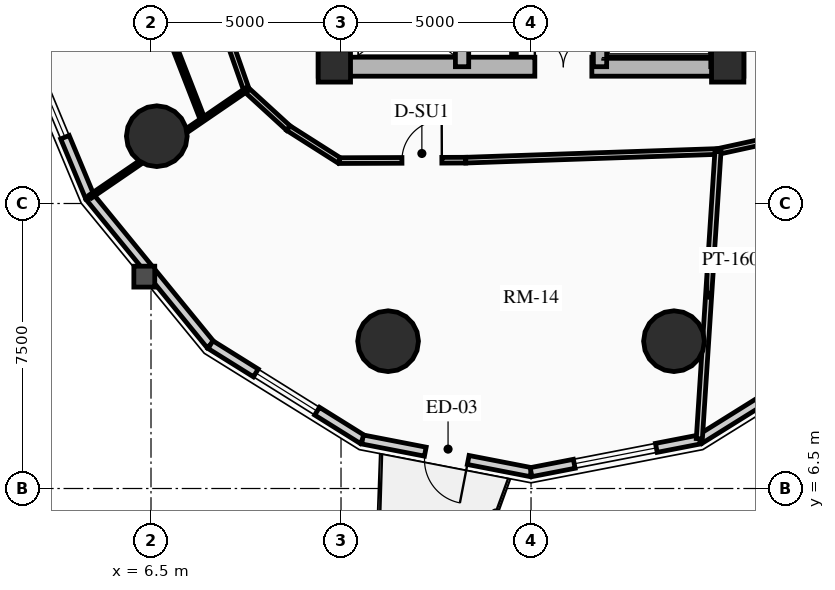
"""IFC4 building model, lengths in metres.
Left out: names, types, materials, properties, quantities, classifications, styles, units other than length and angle.
Written with IfcOpenShell. Run it as: python <this file> out.ifc"""

import sys

from ifc_helpers import new_model, si_unit, direction, frame, frame_2d, origin, origin_2d, place, context, subcontext, project, spatial, rectangle, circle, extrude, source, transform, mapped, element, fill, save


model = new_model("IFC4")
c1 = context("Model", 3, precision=1e-05, world=origin(), true_north=direction((0.0, 1.0)))
c2 = subcontext(c1, "Body", "Model", "MODEL_VIEW")
j1 = project(units=[si_unit("LENGTHUNIT", "METRE"), si_unit("PLANEANGLEUNIT", "RADIAN")], contexts=[c1])
p1 = place(None, origin())
s1 = spatial("IfcSite", under=j1, at=p1, CompositionType="ELEMENT")
p2 = place(p1, origin())
s2 = spatial("IfcBuilding", under=s1, at=p2, CompositionType="ELEMENT")
p3 = place(p2, frame((0.0, 0.0, 24.91)))
s3 = spatial("IfcBuildingStorey", under=s2, at=p3, CompositionType="ELEMENT", Elevation=24.91)
for number, where, z_axis, x_axis in (
    (1, (11.15, 17.35, 0.0), (0.0, 0.0, 1.0), (0.0, 1.0, 0.0)),
    (2, (21.85, 17.35, 0.0), (0.0, 0.0, 1.0), (0.0, 1.0, 0.0)),
):
    element("IfcWall", number, at=place(p3, frame(where, z_axis=z_axis, x_axis=x_axis)), inside=s3, PredefinedType="SHEAR", context=c2, shape_type="SweptSolid", body=[
        extrude(rectangle(XDim=14.3, YDim=0.5, at=frame_2d((7.15, 0.0))), origin(), (0.0, 0.0, 1.0), 2.91),
    ])
p4 = place(p3, frame((11.15, 17.6, 0.0), z_axis=(0.0, 0.0, 1.0), x_axis=(1.0, 0.0, 0.0)))
e3 = element("IfcWall", 3, at=p4, inside=s3, PredefinedType="SHEAR", context=c2, shape_type="SweptSolid", body=[
    extrude(rectangle(XDim=10.7, YDim=0.5, at=frame_2d((5.35, 0.0))), origin(), (0.0, 0.0, 1.0), 2.91),
])
m1 = source(origin(), c2, "Body", "SweptSolid", [
    extrude(rectangle(XDim=1.5, YDim=2.02, at=frame_2d((0.75, 1.01))), frame((0.0, 0.26, 0.0), z_axis=(0.0, -1.0, 0.0), x_axis=(1.0, 0.0, 0.0)), (0.0, 0.0, 1.0), 0.52),
])
p5 = place(p4, frame((5.45, 0.0, 0.0)))
e4 = element("IfcOpeningElement", 4, at=p5, cuts=e3, PredefinedType="OPENING", context=c2, shape_type="MappedRepresentation", body=[
    mapped(m1, transform((0.0, 0.0, 0.0), x_axis=(1.0, 0.0, 0.0), y_axis=(0.0, 1.0, 0.0), z_axis=(0.0, 0.0, 1.0), scale=1.0)),
])
p6 = place(p3, frame((14.685, 17.6, 0.0), z_axis=(0.0, 0.0, 1.0), x_axis=(0.0, 1.0, 0.0)))
e5 = element("IfcWall", 5, at=p6, inside=s3, PredefinedType="SHEAR", context=c2, shape_type="SweptSolid", body=[
    extrude(rectangle(XDim=13.8, YDim=0.35, at=frame_2d((6.9, 0.0))), origin(), (0.0, 0.0, 1.0), 2.91),
])
m2 = source(origin(), c2, "Body", "SweptSolid", [
    extrude(rectangle(XDim=1.1, YDim=2.015, at=frame_2d((0.55, 1.007))), frame((0.0, 0.185, 0.0), z_axis=(0.0, -1.0, 0.0), x_axis=(1.0, 0.0, 0.0)), (0.0, 0.0, 1.0), 0.37),
])
p7 = place(p6, frame((4.9, 0.0, 0.0)))
e6 = element("IfcOpeningElement", 6, at=p7, cuts=e5, PredefinedType="OPENING", context=c2, shape_type="MappedRepresentation", body=[
    mapped(m2, transform((0.0, 0.0, 0.0), x_axis=(1.0, 0.0, 0.0), y_axis=(0.0, 1.0, 0.0), z_axis=(0.0, 0.0, 1.0), scale=1.0)),
])
m3 = source(origin(), c2, "Body", "SweptSolid", [
    extrude(rectangle(XDim=1.15, YDim=2.02, at=frame_2d((0.575, 1.01))), frame((0.0, 0.185, 0.0), z_axis=(0.0, -1.0, 0.0), x_axis=(1.0, 0.0, 0.0)), (0.0, 0.0, 1.0), 0.37),
])
p8 = place(p6, frame((7.32, 0.0, 0.0)))
e7 = element("IfcOpeningElement", 7, at=p8, cuts=e5, PredefinedType="OPENING", context=c2, shape_type="MappedRepresentation", body=[
    mapped(m3, transform((0.0, 0.0, 0.0), x_axis=(1.0, 0.0, 0.0), y_axis=(0.0, 1.0, 0.0), z_axis=(0.0, 0.0, 1.0), scale=1.0)),
])
p9 = place(p3, frame((18.315, 17.6, 0.0), z_axis=(0.0, 0.0, 1.0), x_axis=(0.0, 1.0, 0.0)))
e8 = element("IfcWall", 8, at=p9, inside=s3, PredefinedType="SHEAR", context=c2, shape_type="SweptSolid", body=[
    extrude(rectangle(XDim=13.8, YDim=0.35, at=frame_2d((6.9, 0.0))), origin(), (0.0, 0.0, 1.0), 2.91),
])
p10 = place(p9, frame((10.025, 0.0, 0.0)))
e9 = element("IfcOpeningElement", 9, at=p10, cuts=e8, PredefinedType="OPENING", context=c2, shape_type="MappedRepresentation", body=[
    mapped(m2, transform((0.0, 0.0, 0.0), x_axis=(1.0, 0.0, 0.0), y_axis=(0.0, 1.0, 0.0), z_axis=(0.0, 0.0, 1.0), scale=1.0)),
])
p11 = place(p9, frame((12.025, 0.0, 0.0)))
e10 = element("IfcOpeningElement", 10, at=p11, cuts=e8, PredefinedType="OPENING", context=c2, shape_type="MappedRepresentation", body=[
    mapped(m2, transform((0.0, 0.0, 0.0), x_axis=(1.0, 0.0, 0.0), y_axis=(0.0, 1.0, 0.0), z_axis=(0.0, 0.0, 1.0), scale=1.0)),
])
p12 = place(p9, frame((5.33, 0.0, 0.0)))
e11 = element("IfcOpeningElement", 11, at=p12, cuts=e8, PredefinedType="OPENING", context=c2, shape_type="MappedRepresentation", body=[
    mapped(m3, transform((0.0, 0.0, 0.0), x_axis=(1.0, 0.0, 0.0), y_axis=(0.0, 1.0, 0.0), z_axis=(0.0, 0.0, 1.0), scale=1.0)),
])
p13 = place(p3, frame((21.405, 17.6, 0.0), z_axis=(0.0, 0.0, 1.0), x_axis=(0.0, 1.0, 0.0)))
e12 = element("IfcWall", 12, at=p13, inside=s3, PredefinedType="SHEAR", context=c2, shape_type="SweptSolid", body=[
    extrude(rectangle(XDim=6.745, YDim=0.35, at=frame_2d((3.373, 0.0))), origin(), (0.0, 0.0, 1.0), 2.91),
])
for number, where, z_axis, x_axis in (
    (13, (11.325, 17.62, 0.0), (0.0, 0.0, 1.0), (1.0, 0.0, 0.0)),
    (14, (21.675, 17.62, 0.0), (0.0, 0.0, 1.0), (1.0, 0.0, 0.0)),
):
    element("IfcColumn", number, at=place(p3, frame(where, z_axis=z_axis, x_axis=x_axis)), inside=s3, PredefinedType="COLUMN", context=c2, shape_type="SweptSolid", body=[
        extrude(rectangle(XDim=0.85, YDim=0.85, at=origin_2d()), origin(), (0.0, 0.0, 1.0), 2.91),
    ])
for number, where, z_axis, x_axis in (
    (15, (6.653, 15.771, 0.0), (0.0, 0.0, 1.0), (1.0, 0.0, 0.0)),
    (16, (12.739, 10.377, 0.0), (0.0, 0.0, 1.0), (1.0, 0.0, 0.0)),
    (17, (20.261, 10.377, 0.0), (0.0, 0.0, 1.0), (1.0, 0.0, 0.0)),
):
    element("IfcColumn", number, at=place(p3, frame(where, z_axis=z_axis, x_axis=x_axis)), inside=s3, PredefinedType="USERDEFINED", context=c2, shape_type="SweptSolid", body=[
        extrude(circle(Radius=0.8, at=origin_2d()), origin(), (0.0, 0.0, 1.0), 2.91),
    ])
p14 = place(p3, frame((4.89, 14.173, 0.0), z_axis=(0.0, 0.0, 1.0), x_axis=(-0.384255919668, 0.923226618009, 0.0)))
e18 = element("IfcWall", 18, at=p14, inside=s3, PredefinedType="SOLIDWALL", context=c2, shape_type="SweptSolid", body=[
    extrude(rectangle(XDim=5.305, YDim=0.24, at=frame_2d((2.653, 0.0))), origin(), (0.0, 0.0, 1.0), 2.073),
])
m4 = source(origin(), c2, "Body", "SweptSolid", [
    extrude(rectangle(XDim=1.9, YDim=1.35, at=frame_2d((0.95, 0.675))), frame((0.0, 0.13, 0.0), z_axis=(0.0, -1.0, 0.0), x_axis=(1.0, 0.0, 0.0)), (0.0, 0.0, 1.0), 0.26),
])
p15 = place(p14, frame((1.703, 0.0, 0.65)))
e19 = element("IfcOpeningElement", 19, at=p15, cuts=e18, PredefinedType="OPENING", context=c2, shape_type="MappedRepresentation", body=[
    mapped(m4, transform((0.0, 0.0, 0.0), x_axis=(1.0, 0.0, 0.0), y_axis=(0.0, 1.0, 0.0), z_axis=(0.0, 0.0, 1.0), scale=1.0)),
])
p16 = place(p3, frame((8.065, 10.286, 0.0), z_axis=(0.0, 0.0, 1.0), x_axis=(-0.632588557044, 0.774488035735, 0.0)))
e20 = element("IfcWall", 20, at=p16, inside=s3, PredefinedType="SOLIDWALL", context=c2, shape_type="SweptSolid", body=[
    extrude(rectangle(XDim=5.019, YDim=0.24, at=frame_2d((2.509, 0.0))), origin(), (0.0, 0.0, 1.0), 2.073),
])
p17 = place(p3, frame((12.065, 7.79, 0.0), z_axis=(0.0, 0.0, 1.0), x_axis=(-0.848422721916, 0.529319265601, 0.0)))
e21 = element("IfcWall", 21, at=p17, inside=s3, PredefinedType="SOLIDWALL", context=c2, shape_type="SweptSolid", body=[
    extrude(rectangle(XDim=4.715, YDim=0.24, at=frame_2d((2.357, 0.0))), origin(), (0.0, 0.0, 1.0), 2.073),
])
p18 = place(p17, frame((1.408, 0.0, 0.65)))
e22 = element("IfcOpeningElement", 22, at=p18, cuts=e21, PredefinedType="OPENING", context=c2, shape_type="MappedRepresentation", body=[
    mapped(m4, transform((0.0, 0.0, 0.0), x_axis=(1.0, 0.0, 0.0), y_axis=(0.0, 1.0, 0.0), z_axis=(0.0, 0.0, 1.0), scale=1.0)),
])
p19 = place(p3, frame((16.5, 6.93, 0.0), z_axis=(0.0, 0.0, 1.0), x_axis=(-0.981717351035, 0.190344536766, 0.0)))
e23 = element("IfcWall", 23, at=p19, inside=s3, PredefinedType="SOLIDWALL", context=c2, shape_type="SweptSolid", body=[
    extrude(rectangle(XDim=4.517, YDim=0.24, at=frame_2d((2.259, 0.0))), origin(), (0.0, 0.0, 1.0), 2.073),
])
m5 = source(origin(), c2, "Body", "SweptSolid", [
    extrude(rectangle(XDim=1.15, YDim=2.005, at=frame_2d((0.575, 1.002))), frame((0.0, 0.13, 0.0), z_axis=(0.0, -1.0, 0.0), x_axis=(1.0, 0.0, 0.0)), (0.0, 0.0, 1.0), 0.26),
])
p20 = place(p19, frame((1.684, 0.0, 0.0)))
e24 = element("IfcOpeningElement", 24, at=p20, cuts=e23, PredefinedType="OPENING", context=c2, shape_type="MappedRepresentation", body=[
    mapped(m5, transform((0.0, 0.0, 0.0), x_axis=(1.0, 0.0, 0.0), y_axis=(0.0, 1.0, 0.0), z_axis=(0.0, 0.0, 1.0), scale=1.0)),
])
p21 = place(p3, frame((20.935, 7.79, 0.0), z_axis=(0.0, 0.0, 1.0), x_axis=(-0.981717351035, -0.190344536766, 0.0)))
e25 = element("IfcWall", 25, at=p21, inside=s3, PredefinedType="SOLIDWALL", context=c2, shape_type="SweptSolid", body=[
    extrude(rectangle(XDim=4.517, YDim=0.24, at=frame_2d((2.259, 0.0))), origin(), (0.0, 0.0, 1.0), 2.073),
])
m6 = source(origin(), c2, "Body", "SweptSolid", [
    extrude(rectangle(XDim=2.2, YDim=1.35, at=frame_2d((1.1, 0.675))), frame((0.0, 0.13, 0.0), z_axis=(0.0, -1.0, 0.0), x_axis=(1.0, 0.0, 0.0)), (0.0, 0.0, 1.0), 0.26),
])
p22 = place(p21, frame((1.159, 0.0, 0.65)))
e26 = element("IfcOpeningElement", 26, at=p22, cuts=e25, PredefinedType="OPENING", context=c2, shape_type="MappedRepresentation", body=[
    mapped(m6, transform((0.0, 0.0, 0.0), x_axis=(1.0, 0.0, 0.0), y_axis=(0.0, 1.0, 0.0), z_axis=(0.0, 0.0, 1.0), scale=1.0)),
])
p23 = place(p3, frame((24.935, 10.286, 0.0), z_axis=(0.0, 0.0, 1.0), x_axis=(-0.848422721916, -0.529319265601, 0.0)))
e27 = element("IfcWall", 27, at=p23, inside=s3, PredefinedType="SOLIDWALL", context=c2, shape_type="SweptSolid", body=[
    extrude(rectangle(XDim=4.715, YDim=0.24, at=frame_2d((2.357, 0.0))), origin(), (0.0, 0.0, 1.0), 2.073),
])
p24 = place(p3, frame((16.05, 17.92, 0.0), z_axis=(0.0, 0.0, 1.0), x_axis=(0.0, 1.0, 0.0)))
e28 = element("IfcWall", 28, at=p24, inside=s3, PredefinedType="PARTITIONING", context=c2, shape_type="SweptSolid", body=[
    extrude(rectangle(XDim=1.8, YDim=0.125, at=frame_2d((0.9, 0.0))), origin(), (0.0, 0.0, 1.0), 2.635),
])
m7 = source(origin(), c2, "Body", "SweptSolid", [
    extrude(rectangle(XDim=0.9, YDim=2.005, at=frame_2d((0.45, 1.002))), frame((0.0, 0.073, 0.0), z_axis=(0.0, -1.0, 0.0), x_axis=(1.0, 0.0, 0.0)), (0.0, 0.0, 1.0), 0.145),
])
p25 = place(p24, frame((0.42, 0.0, 0.0)))
e29 = element("IfcOpeningElement", 29, at=p25, cuts=e28, PredefinedType="OPENING", context=c2, shape_type="MappedRepresentation", body=[
    mapped(m7, transform((0.0, 0.0, 0.0), x_axis=(1.0, 0.0, 0.0), y_axis=(0.0, 1.0, 0.0), z_axis=(0.0, 0.0, 1.0), scale=1.0)),
])
p26 = place(p3, frame((8.538, 18.338, 0.0), z_axis=(0.0, 0.0, 1.0), x_axis=(0.331358150167, -0.94350504838, 0.0)))
e30 = element("IfcWall", 30, at=p26, inside=s3, PredefinedType="PARTITIONING", context=c2, shape_type="SweptSolid", body=[
    extrude(rectangle(XDim=1.424, YDim=0.15, at=frame_2d((0.712, 0.0))), origin(), (0.0, 0.0, 1.0), 2.205),
])
p27 = place(p3, frame((9.01, 16.994, 0.0), z_axis=(0.0, 0.0, 1.0), x_axis=(0.737701798986, -0.67512669609, 0.0)))
e31 = element("IfcWall", 31, at=p27, inside=s3, PredefinedType="PARTITIONING", context=c2, shape_type="SweptSolid", body=[
    extrude(rectangle(XDim=1.498, YDim=0.15, at=frame_2d((0.749, 0.0))), origin(), (0.0, 0.0, 1.0), 2.159),
])
p28 = place(p3, frame((10.115, 15.983, 0.0), z_axis=(0.0, 0.0, 1.0), x_axis=(0.843995849351, -0.536349705209, 0.0)))
e32 = element("IfcWall", 32, at=p28, inside=s3, PredefinedType="PARTITIONING", context=c2, shape_type="SweptSolid", body=[
    extrude(rectangle(XDim=1.593, YDim=0.15, at=frame_2d((0.796, 0.0))), origin(), (0.0, 0.0, 1.0), 2.205),
])
p29 = place(p3, frame((11.46, 15.129, 0.0), z_axis=(0.0, 0.0, 1.0), x_axis=(0.999993513287, 0.003601858435, 0.0)))
e33 = element("IfcWall", 33, at=p29, inside=s3, PredefinedType="PARTITIONING", context=c2, shape_type="SweptSolid", body=[
    extrude(rectangle(XDim=3.321, YDim=0.15, at=frame_2d((1.661, 0.0))), origin(), (0.0, 0.0, 1.0), 2.159),
])
m8 = source(origin(), c2, "Body", "SweptSolid", [
    extrude(rectangle(XDim=1.05, YDim=2.015, at=frame_2d((0.525, 1.007))), frame((0.0, 0.085, 0.0), z_axis=(0.0, -1.0, 0.0), x_axis=(1.0, 0.0, 0.0)), (0.0, 0.0, 1.0), 0.17),
])
p30 = place(p29, frame((1.643, 0.0, 0.0)))
e34 = element("IfcOpeningElement", 34, at=p30, cuts=e33, PredefinedType="OPENING", context=c2, shape_type="MappedRepresentation", body=[
    mapped(m8, transform((0.0, 0.0, 0.0), x_axis=(1.0, 0.0, 0.0), y_axis=(0.0, 1.0, 0.0), z_axis=(0.0, 0.0, 1.0), scale=1.0)),
])
p31 = place(p3, frame((14.781, 15.141, 0.0), z_axis=(0.0, 0.0, 1.0), x_axis=(0.999407918707, 0.034406569513, 0.0)))
e35 = element("IfcWall", 35, at=p31, inside=s3, PredefinedType="PARTITIONING", context=c2, shape_type="SweptSolid", body=[
    extrude(rectangle(XDim=6.642, YDim=0.15, at=frame_2d((3.321, 0.0))), origin(), (0.0, 0.0, 1.0), 2.159),
])
p32 = place(p3, frame((21.419, 15.369, 0.0), z_axis=(0.0, 0.0, 1.0), x_axis=(0.977192701953, 0.212354475464, 0.0)))
e36 = element("IfcWall", 36, at=p32, inside=s3, PredefinedType="PARTITIONING", context=c2, shape_type="SweptSolid", body=[
    extrude(rectangle(XDim=1.888, YDim=0.15, at=frame_2d((0.944, 0.0))), origin(), (0.0, 0.0, 1.0), 2.205),
])
p33 = place(p3, frame((9.01, 16.994, 0.0), z_axis=(0.0, 0.0, 1.0), x_axis=(-0.825130244962, -0.564942544733, 0.0)))
e37 = element("IfcWall", 37, at=p33, inside=s3, PredefinedType="MOVABLE", context=c2, shape_type="SweptSolid", body=[
    extrude(rectangle(XDim=4.974, YDim=0.1, at=frame_2d((2.487, 0.0))), origin(), (0.0, 0.0, 1.0), 2.073),
])
p34 = place(p3, frame((21.419, 15.369, 0.0), z_axis=(0.0, 0.0, 1.0), x_axis=(-0.064709408161, -0.997904149954, 0.0)))
e38 = element("IfcWall", 38, at=p34, inside=s3, PredefinedType="PARTITIONING", context=c2, shape_type="SweptSolid", body=[
    extrude(rectangle(XDim=7.576, YDim=0.16, at=frame_2d((3.788, 0.0))), origin(), (0.0, 0.0, 1.0), 2.073),
])
p35 = place(p3, frame((6.951, 18.545, 0.0), z_axis=(0.0, 0.0, 1.0), x_axis=(0.362681113276, -0.931913306093, 0.0)))
e39 = element("IfcWall", 39, at=p35, inside=s3, PredefinedType="PARTITIONING", context=c2, shape_type="SweptSolid", body=[
    extrude(rectangle(XDim=2.508, YDim=0.125, at=frame_2d((1.254, 0.0))), origin(), (0.0, 0.0, 1.0), 2.159),
])
m9 = source(origin(), c2, "Body", "SweptSolid", [
    extrude(rectangle(XDim=1.9, YDim=1.35, at=frame_2d((0.95, 0.675))), frame((0.0, 0.03, 0.0), z_axis=(0.0, -1.0, 0.0), x_axis=(1.0, 0.0, 0.0)), (0.0, 0.0, 1.0), 0.06),
])
p36 = place(p15, origin())
e40 = element("IfcWindow", 40, at=p36, inside=s3, PartitioningType="DOUBLE_PANEL_VERTICAL", PredefinedType="WINDOW", context=c2, shape_type="MappedRepresentation", body=[
    mapped(m9, transform((0.0, 0.0, 0.0), x_axis=(1.0, 0.0, 0.0), y_axis=(0.0, 1.0, 0.0), z_axis=(0.0, 0.0, 1.0), scale=1.0)),
])
fill(e19, e40)
p37 = place(p18, origin())
e41 = element("IfcWindow", 41, at=p37, inside=s3, PartitioningType="DOUBLE_PANEL_VERTICAL", PredefinedType="WINDOW", context=c2, shape_type="MappedRepresentation", body=[
    mapped(m9, transform((0.0, 0.0, 0.0), x_axis=(1.0, 0.0, 0.0), y_axis=(0.0, 1.0, 0.0), z_axis=(0.0, 0.0, 1.0), scale=1.0)),
])
fill(e22, e41)
m10 = source(origin(), c2, "Body", "SweptSolid", [
    extrude(rectangle(XDim=1.15, YDim=2.005, at=frame_2d((0.575, 1.002))), frame((0.0, 0.025, 0.0), z_axis=(0.0, -1.0, 0.0), x_axis=(1.0, 0.0, 0.0)), (0.0, 0.0, 1.0), 0.05),
])
p38 = place(p20, origin())
e42 = element("IfcDoor", 42, at=p38, inside=s3, OperationType="SINGLE_SWING_LEFT", PredefinedType="DOOR", context=c2, shape_type="MappedRepresentation", body=[
    mapped(m10, transform((0.0, 0.0, 0.0), x_axis=(1.0, 0.0, 0.0), y_axis=(0.0, 1.0, 0.0), z_axis=(0.0, 0.0, 1.0), scale=1.0)),
])
fill(e24, e42)
m11 = source(origin(), c2, "Body", "SweptSolid", [
    extrude(rectangle(XDim=2.2, YDim=1.35, at=frame_2d((1.1, 0.675))), frame((0.0, 0.03, 0.0), z_axis=(0.0, -1.0, 0.0), x_axis=(1.0, 0.0, 0.0)), (0.0, 0.0, 1.0), 0.06),
])
p39 = place(p22, origin())
e43 = element("IfcWindow", 43, at=p39, inside=s3, PartitioningType="DOUBLE_PANEL_VERTICAL", PredefinedType="WINDOW", context=c2, shape_type="MappedRepresentation", body=[
    mapped(m11, transform((0.0, 0.0, 0.0), x_axis=(1.0, 0.0, 0.0), y_axis=(0.0, 1.0, 0.0), z_axis=(0.0, 0.0, 1.0), scale=1.0)),
])
fill(e26, e43)
m12 = source(origin(), c2, "Body", "SweptSolid", [
    extrude(rectangle(XDim=1.5, YDim=2.02, at=frame_2d((0.75, 1.01))), frame((0.0, 0.025, 0.0), z_axis=(0.0, -1.0, 0.0), x_axis=(1.0, 0.0, 0.0)), (0.0, 0.0, 1.0), 0.05),
])
p40 = place(p5, origin())
e44 = element("IfcDoor", 44, at=p40, inside=s3, OperationType="DOUBLE_DOOR_SINGLE_SWING", PredefinedType="DOOR", context=c2, shape_type="MappedRepresentation", body=[
    mapped(m12, transform((0.0, 0.0, 0.0), x_axis=(1.0, 0.0, 0.0), y_axis=(0.0, 1.0, 0.0), z_axis=(0.0, 0.0, 1.0), scale=1.0)),
])
fill(e4, e44)
m13 = source(origin(), c2, "Body", "SweptSolid", [
    extrude(rectangle(XDim=1.05, YDim=2.015, at=frame_2d((0.525, 1.007))), frame((0.0, 0.025, 0.0), z_axis=(0.0, -1.0, 0.0), x_axis=(1.0, 0.0, 0.0)), (0.0, 0.0, 1.0), 0.05),
])
p41 = place(p30, origin())
e45 = element("IfcDoor", 45, at=p41, inside=s3, OperationType="SINGLE_SWING_RIGHT", PredefinedType="DOOR", context=c2, shape_type="MappedRepresentation", body=[
    mapped(m13, transform((0.0, 0.0, 0.0), x_axis=(1.0, 0.0, 0.0), y_axis=(0.0, 1.0, 0.0), z_axis=(0.0, 0.0, 1.0), scale=1.0)),
])
fill(e34, e45)
save(model, sys.argv[1])
